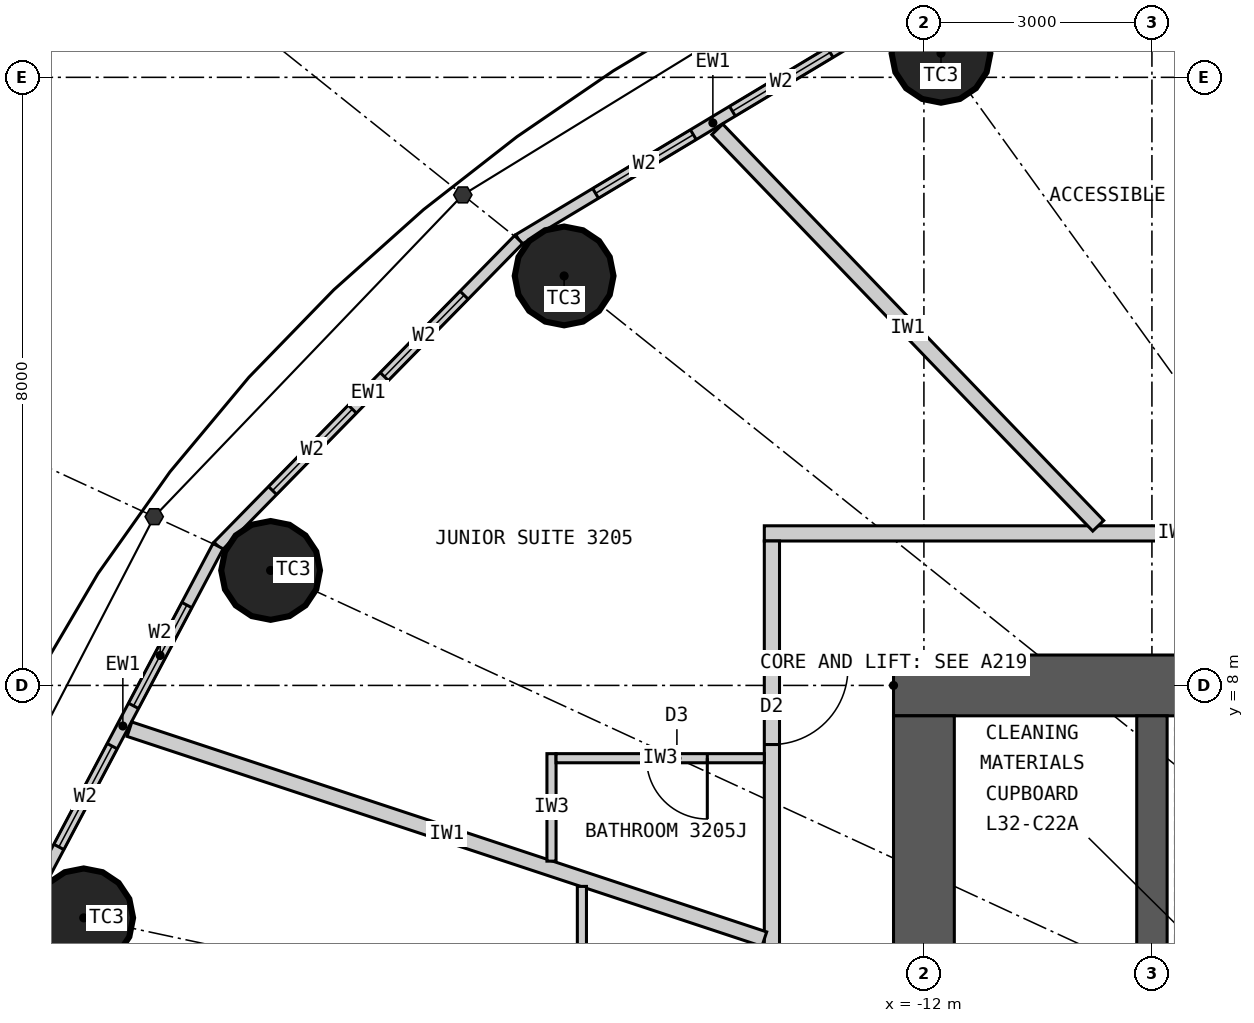
"""IFC4 building model, lengths in metres.
Left out: names, types, materials, properties, quantities, classifications, styles, units other than length and angle.
Written with IfcOpenShell. Run it as: python <this file> out.ifc"""

import sys

from ifc_helpers import new_model, si_unit, direction, frame, frame_2d, origin, origin_2d, place, context, subcontext, project, spatial, rectangle, circle, extrude, element, fill, save


model = new_model("IFC4")
c1 = context("Model", 3, precision=1e-05, world=origin(), true_north=direction((0.0, 1.0)))
c2 = subcontext(c1, "Body", "Model", "MODEL_VIEW")
j1 = project(units=[si_unit("LENGTHUNIT", "METRE"), si_unit("PLANEANGLEUNIT", "RADIAN")], contexts=[c1])
p1 = place(None, origin())
s1 = spatial("IfcSite", under=j1, at=p1, CompositionType="ELEMENT")
p2 = place(p1, origin())
s2 = spatial("IfcBuilding", under=s1, at=p2, CompositionType="ELEMENT")
p3 = place(p2, frame((0.0, 0.0, 125.4)))
s3 = spatial("IfcBuildingStorey", under=s2, at=p3, CompositionType="ELEMENT", Elevation=125.4)
for number, where, z_axis, x_axis in (
    (1, (-11.775, 16.316, 0.0), (0.0, 0.0, 1.0), (1.0, 0.0, 0.0)),
    (2, (-16.734, 13.387, 0.0), (0.0, 0.0, 1.0), (1.0, 0.0, 0.0)),
    (3, (-20.596, 9.513, 0.0), (0.0, 0.0, 1.0), (1.0, 0.0, 0.0)),
    (4, (-23.055, 4.942, 0.0), (0.0, 0.0, 1.0), (1.0, 0.0, 0.0)),
):
    element("IfcColumn", number, at=place(p3, frame(where, z_axis=z_axis, x_axis=x_axis)), inside=s3, PredefinedType="COLUMN", context=c2, shape_type="SweptSolid", body=[
        extrude(circle(Radius=0.65, at=origin_2d()), origin(), (0.0, 0.0, 1.0), 3.3),
    ])
p4 = place(p3, frame((-12.4, 8.0, 0.0), z_axis=(0.0, 0.0, 1.0), x_axis=(1.0, 0.0, 0.0)))
e5 = element("IfcWall", 5, at=p4, inside=s3, PredefinedType="SHEAR", context=c2, shape_type="SweptSolid", body=[
    extrude(rectangle(XDim=24.8, YDim=0.8, at=frame_2d((12.4, 0.0))), origin(), (0.0, 0.0, 1.0), 3.3),
])
p5 = place(p4, frame((11.1, 0.0, 0.0)))
e6 = element("IfcOpeningElement", 6, at=p5, cuts=e5, PredefinedType="OPENING", context=c2, shape_type="SweptSolid", body=[
    extrude(rectangle(XDim=1.2, YDim=2.2, at=frame_2d((0.6, 1.1))), frame((0.0, 0.41, 0.0), z_axis=(0.0, -1.0, 0.0), x_axis=(1.0, 0.0, 0.0)), (0.0, 0.0, 1.0), 0.82),
])
p6 = place(p4, frame((18.7, 0.0, 0.0)))
e7 = element("IfcOpeningElement", 7, at=p6, cuts=e5, PredefinedType="OPENING", context=c2, shape_type="SweptSolid", body=[
    extrude(rectangle(XDim=0.9, YDim=2.2, at=frame_2d((0.45, 1.1))), frame((0.0, 0.41, 0.0), z_axis=(0.0, -1.0, 0.0), x_axis=(1.0, 0.0, 0.0)), (0.0, 0.0, 1.0), 0.82),
])
p7 = place(p3, frame((-12.0, 7.6, 0.0), z_axis=(0.0, 0.0, 1.0), x_axis=(0.0, -1.0, 0.0)))
e8 = element("IfcWall", 8, at=p7, inside=s3, PredefinedType="SHEAR", context=c2, shape_type="SweptSolid", body=[
    extrude(rectangle(XDim=15.2, YDim=0.8, at=frame_2d((7.6, 0.0))), origin(), (0.0, 0.0, 1.0), 3.3),
])
p8 = place(p7, frame((6.7, 0.0, 0.0)))
e9 = element("IfcOpeningElement", 9, at=p8, cuts=e8, PredefinedType="OPENING", context=c2, shape_type="SweptSolid", body=[
    extrude(rectangle(XDim=1.8, YDim=2.2, at=frame_2d((0.9, 1.1))), frame((0.0, 0.41, 0.0), z_axis=(0.0, -1.0, 0.0), x_axis=(1.0, 0.0, 0.0)), (0.0, 0.0, 1.0), 0.82),
])
p9 = place(p3, frame((-9.0, 4.5, 0.0), z_axis=(0.0, 0.0, 1.0), x_axis=(0.0, 1.0, 0.0)))
e10 = element("IfcWall", 10, at=p9, inside=s3, PredefinedType="SHEAR", context=c2, shape_type="SweptSolid", body=[
    extrude(rectangle(XDim=3.1, YDim=0.4, at=frame_2d((1.55, 0.0))), origin(), (0.0, 0.0, 1.0), 3.3),
])
p10 = place(p3, frame((-12.221, 16.935, 0.0), z_axis=(0.0, 0.0, 1.0), x_axis=(-0.857308573723, -0.514802884044, 0.0)))
e11 = element("IfcWall", 11, at=p10, inside=s3, PredefinedType="ELEMENTEDWALL", context=c2, shape_type="SweptSolid", body=[
    extrude(rectangle(XDim=5.961, YDim=0.15, at=frame_2d((2.98, 0.0))), origin(), (0.0, 0.0, 1.0), 3.12),
])
p11 = place(p10, frame((1.181, 0.0, 0.9)))
e12 = element("IfcOpeningElement", 12, at=p11, cuts=e11, PredefinedType="OPENING", context=c2, shape_type="SweptSolid", body=[
    extrude(rectangle(XDim=1.5, YDim=1.9, at=frame_2d((0.75, 0.95))), frame((0.0, 0.085, 0.0), z_axis=(0.0, -1.0, 0.0), x_axis=(1.0, 0.0, 0.0)), (0.0, 0.0, 1.0), 0.17),
])
p12 = place(p10, frame((3.281, 0.0, 0.9)))
e13 = element("IfcOpeningElement", 13, at=p12, cuts=e11, PredefinedType="OPENING", context=c2, shape_type="SweptSolid", body=[
    extrude(rectangle(XDim=1.5, YDim=1.9, at=frame_2d((0.75, 0.95))), frame((0.0, 0.085, 0.0), z_axis=(0.0, -1.0, 0.0), x_axis=(1.0, 0.0, 0.0)), (0.0, 0.0, 1.0), 0.17),
])
p13 = place(p3, frame((-17.332, 13.866, 0.0), z_axis=(0.0, 0.0, 1.0), x_axis=(-0.700136650834, -0.714008872605, 0.0)))
e14 = element("IfcWall", 14, at=p13, inside=s3, PredefinedType="ELEMENTEDWALL", context=c2, shape_type="SweptSolid", body=[
    extrude(rectangle(XDim=5.649, YDim=0.15, at=frame_2d((2.825, 0.0))), origin(), (0.0, 0.0, 1.0), 3.12),
])
p14 = place(p13, frame((1.025, 0.0, 0.9)))
e15 = element("IfcOpeningElement", 15, at=p14, cuts=e14, PredefinedType="OPENING", context=c2, shape_type="SweptSolid", body=[
    extrude(rectangle(XDim=1.5, YDim=1.9, at=frame_2d((0.75, 0.95))), frame((0.0, 0.085, 0.0), z_axis=(0.0, -1.0, 0.0), x_axis=(1.0, 0.0, 0.0)), (0.0, 0.0, 1.0), 0.17),
])
p15 = place(p13, frame((3.125, 0.0, 0.9)))
e16 = element("IfcOpeningElement", 16, at=p15, cuts=e14, PredefinedType="OPENING", context=c2, shape_type="SweptSolid", body=[
    extrude(rectangle(XDim=1.5, YDim=1.9, at=frame_2d((0.75, 0.95))), frame((0.0, 0.085, 0.0), z_axis=(0.0, -1.0, 0.0), x_axis=(1.0, 0.0, 0.0)), (0.0, 0.0, 1.0), 0.17),
])
p16 = place(p3, frame((-21.287, 9.832, 0.0), z_axis=(0.0, 0.0, 1.0), x_axis=(-0.467814388454, -0.883826735257, 0.0)))
e17 = element("IfcWall", 17, at=p16, inside=s3, PredefinedType="ELEMENTEDWALL", context=c2, shape_type="SweptSolid", body=[
    extrude(rectangle(XDim=5.354, YDim=0.15, at=frame_2d((2.677, 0.0))), origin(), (0.0, 0.0, 1.0), 3.12),
])
p17 = place(p16, frame((0.877, 0.0, 0.9)))
e18 = element("IfcOpeningElement", 18, at=p17, cuts=e17, PredefinedType="OPENING", context=c2, shape_type="SweptSolid", body=[
    extrude(rectangle(XDim=1.5, YDim=1.9, at=frame_2d((0.75, 0.95))), frame((0.0, 0.085, 0.0), z_axis=(0.0, -1.0, 0.0), x_axis=(1.0, 0.0, 0.0)), (0.0, 0.0, 1.0), 0.17),
])
p18 = place(p16, frame((2.977, 0.0, 0.9)))
e19 = element("IfcOpeningElement", 19, at=p18, cuts=e17, PredefinedType="OPENING", context=c2, shape_type="SweptSolid", body=[
    extrude(rectangle(XDim=1.5, YDim=1.9, at=frame_2d((0.75, 0.95))), frame((0.0, 0.085, 0.0), z_axis=(0.0, -1.0, 0.0), x_axis=(1.0, 0.0, 0.0)), (0.0, 0.0, 1.0), 0.17),
])
p19 = place(p3, frame((-14.1, 10.0, 0.0), z_axis=(0.0, 0.0, 1.0), x_axis=(1.0, 0.0, 0.0)))
e20 = element("IfcWall", 20, at=p19, inside=s3, PredefinedType="PARTITIONING", context=c2, shape_type="SweptSolid", body=[
    extrude(rectangle(XDim=10.817, YDim=0.2, at=frame_2d((5.409, 0.0))), origin(), (0.0, 0.0, 1.0), 3.12),
])
p20 = place(p3, frame((-14.0, 9.9, 0.0), z_axis=(0.0, 0.0, 1.0), x_axis=(0.0, -1.0, 0.0)))
e21 = element("IfcWall", 21, at=p20, inside=s3, PredefinedType="PARTITIONING", context=c2, shape_type="SweptSolid", body=[
    extrude(rectangle(XDim=19.8, YDim=0.2, at=frame_2d((9.9, 0.0))), origin(), (0.0, 0.0, 1.0), 3.12),
])
p21 = place(p20, frame((1.678, 0.0, 0.0)))
e22 = element("IfcOpeningElement", 22, at=p21, cuts=e21, PredefinedType="OPENING", context=c2, shape_type="SweptSolid", body=[
    extrude(rectangle(XDim=1.0, YDim=2.2, at=frame_2d((0.5, 1.1))), frame((0.0, 0.11, 0.0), z_axis=(0.0, -1.0, 0.0), x_axis=(1.0, 0.0, 0.0)), (0.0, 0.0, 1.0), 0.22),
])
p22 = place(p20, frame((7.598, 0.0, 0.0)))
e23 = element("IfcOpeningElement", 23, at=p22, cuts=e21, PredefinedType="OPENING", context=c2, shape_type="SweptSolid", body=[
    extrude(rectangle(XDim=1.0, YDim=2.2, at=frame_2d((0.5, 1.1))), frame((0.0, 0.11, 0.0), z_axis=(0.0, -1.0, 0.0), x_axis=(1.0, 0.0, 0.0)), (0.0, 0.0, 1.0), 0.22),
])
p23 = place(p20, frame((12.26, 0.0, 0.0)))
e24 = element("IfcOpeningElement", 24, at=p23, cuts=e21, PredefinedType="OPENING", context=c2, shape_type="SweptSolid", body=[
    extrude(rectangle(XDim=1.0, YDim=2.2, at=frame_2d((0.5, 1.1))), frame((0.0, 0.11, 0.0), z_axis=(0.0, -1.0, 0.0), x_axis=(1.0, 0.0, 0.0)), (0.0, 0.0, 1.0), 0.22),
])
p24 = place(p20, frame((16.922, 0.0, 0.0)))
e25 = element("IfcOpeningElement", 25, at=p24, cuts=e21, PredefinedType="OPENING", context=c2, shape_type="SweptSolid", body=[
    extrude(rectangle(XDim=1.0, YDim=2.2, at=frame_2d((0.5, 1.1))), frame((0.0, 0.11, 0.0), z_axis=(0.0, -1.0, 0.0), x_axis=(1.0, 0.0, 0.0)), (0.0, 0.0, 1.0), 0.22),
])
p25 = place(p3, frame((-9.706, 10.1, 0.0), z_axis=(0.0, 0.0, 1.0), x_axis=(-0.692944801824, 0.720990639069, 0.0)))
e26 = element("IfcWall", 26, at=p25, inside=s3, PredefinedType="PARTITIONING", context=c2, shape_type="SweptSolid", body=[
    extrude(rectangle(XDim=7.234, YDim=0.2, at=frame_2d((3.617, 0.0))), origin(), (0.0, 0.0, 1.0), 3.12),
])
p26 = place(p3, frame((-14.1, 4.662, 0.0), z_axis=(0.0, 0.0, 1.0), x_axis=(-0.949446466373, 0.313928984789, 0.0)))
e27 = element("IfcWall", 27, at=p26, inside=s3, PredefinedType="PARTITIONING", context=c2, shape_type="SweptSolid", body=[
    extrude(rectangle(XDim=8.797, YDim=0.2, at=frame_2d((4.399, 0.0))), origin(), (0.0, 0.0, 1.0), 3.12),
])
p27 = place(p3, frame((-16.9, 5.688, 0.0), z_axis=(0.0, 0.0, 1.0), x_axis=(0.0, 1.0, 0.0)))
e28 = element("IfcWall", 28, at=p27, inside=s3, PredefinedType="PARTITIONING", context=c2, shape_type="SweptSolid", body=[
    extrude(rectangle(XDim=1.414, YDim=0.12, at=frame_2d((0.707, 0.0))), origin(), (0.0, 0.0, 1.0), 3.12),
])
p28 = place(p3, frame((-14.1, 7.042, 0.0), z_axis=(0.0, 0.0, 1.0), x_axis=(-1.0, 0.0, 0.0)))
e29 = element("IfcWall", 29, at=p28, inside=s3, PredefinedType="PARTITIONING", context=c2, shape_type="SweptSolid", body=[
    extrude(rectangle(XDim=2.74, YDim=0.12, at=frame_2d((1.37, 0.0))), origin(), (0.0, 0.0, 1.0), 3.12),
])
p29 = place(p28, frame((0.75, 0.0, 0.0)))
e30 = element("IfcOpeningElement", 30, at=p29, cuts=e29, PredefinedType="OPENING", context=c2, shape_type="SweptSolid", body=[
    extrude(rectangle(XDim=0.8, YDim=2.1, at=frame_2d((0.4, 1.05))), frame((0.0, 0.07, 0.0), z_axis=(0.0, -1.0, 0.0), x_axis=(1.0, 0.0, 0.0)), (0.0, 0.0, 1.0), 0.14),
])
p30 = place(p3, frame((-16.5, 5.356, 0.0), z_axis=(0.0, 0.0, 1.0), x_axis=(0.0, -1.0, 0.0)))
e31 = element("IfcWall", 31, at=p30, inside=s3, PredefinedType="PARTITIONING", context=c2, shape_type="SweptSolid", body=[
    extrude(rectangle(XDim=2.934, YDim=0.12, at=frame_2d((1.467, 0.0))), origin(), (0.0, 0.0, 1.0), 3.12),
])
p31 = place(p11, origin())
e32 = element("IfcWindow", 32, at=p31, inside=s3, PartitioningType="SINGLE_PANEL", PredefinedType="WINDOW", context=c2, shape_type="SweptSolid", body=[
    extrude(rectangle(XDim=1.5, YDim=1.9, at=frame_2d((0.75, 0.95))), frame((0.0, 0.03, 0.0), z_axis=(0.0, -1.0, 0.0), x_axis=(1.0, 0.0, 0.0)), (0.0, 0.0, 1.0), 0.06),
])
fill(e12, e32)
p32 = place(p12, origin())
e33 = element("IfcWindow", 33, at=p32, inside=s3, PartitioningType="SINGLE_PANEL", PredefinedType="WINDOW", context=c2, shape_type="SweptSolid", body=[
    extrude(rectangle(XDim=1.5, YDim=1.9, at=frame_2d((0.75, 0.95))), frame((0.0, 0.03, 0.0), z_axis=(0.0, -1.0, 0.0), x_axis=(1.0, 0.0, 0.0)), (0.0, 0.0, 1.0), 0.06),
])
fill(e13, e33)
p33 = place(p14, origin())
e34 = element("IfcWindow", 34, at=p33, inside=s3, PartitioningType="SINGLE_PANEL", PredefinedType="WINDOW", context=c2, shape_type="SweptSolid", body=[
    extrude(rectangle(XDim=1.5, YDim=1.9, at=frame_2d((0.75, 0.95))), frame((0.0, 0.03, 0.0), z_axis=(0.0, -1.0, 0.0), x_axis=(1.0, 0.0, 0.0)), (0.0, 0.0, 1.0), 0.06),
])
fill(e15, e34)
p34 = place(p15, origin())
e35 = element("IfcWindow", 35, at=p34, inside=s3, PartitioningType="SINGLE_PANEL", PredefinedType="WINDOW", context=c2, shape_type="SweptSolid", body=[
    extrude(rectangle(XDim=1.5, YDim=1.9, at=frame_2d((0.75, 0.95))), frame((0.0, 0.03, 0.0), z_axis=(0.0, -1.0, 0.0), x_axis=(1.0, 0.0, 0.0)), (0.0, 0.0, 1.0), 0.06),
])
fill(e16, e35)
p35 = place(p17, origin())
e36 = element("IfcWindow", 36, at=p35, inside=s3, PartitioningType="SINGLE_PANEL", PredefinedType="WINDOW", context=c2, shape_type="SweptSolid", body=[
    extrude(rectangle(XDim=1.5, YDim=1.9, at=frame_2d((0.75, 0.95))), frame((0.0, 0.03, 0.0), z_axis=(0.0, -1.0, 0.0), x_axis=(1.0, 0.0, 0.0)), (0.0, 0.0, 1.0), 0.06),
])
fill(e18, e36)
p36 = place(p18, origin())
e37 = element("IfcWindow", 37, at=p36, inside=s3, PartitioningType="SINGLE_PANEL", PredefinedType="WINDOW", context=c2, shape_type="SweptSolid", body=[
    extrude(rectangle(XDim=1.5, YDim=1.9, at=frame_2d((0.75, 0.95))), frame((0.0, 0.03, 0.0), z_axis=(0.0, -1.0, 0.0), x_axis=(1.0, 0.0, 0.0)), (0.0, 0.0, 1.0), 0.06),
])
fill(e19, e37)
p37 = place(p29, origin())
e38 = element("IfcDoor", 38, at=p37, inside=s3, OperationType="SINGLE_SWING_LEFT", PredefinedType="DOOR", context=c2, shape_type="SweptSolid", body=[
    extrude(rectangle(XDim=0.8, YDim=2.1, at=frame_2d((0.4, 1.05))), frame((0.0, 0.025, 0.0), z_axis=(0.0, -1.0, 0.0), x_axis=(1.0, 0.0, 0.0)), (0.0, 0.0, 1.0), 0.05),
])
fill(e30, e38)
p38 = place(p21, origin())
e39 = element("IfcDoor", 39, at=p38, inside=s3, OperationType="SINGLE_SWING_LEFT", PredefinedType="DOOR", context=c2, shape_type="SweptSolid", body=[
    extrude(rectangle(XDim=1.0, YDim=2.2, at=frame_2d((0.5, 1.1))), frame((0.0, 0.025, 0.0), z_axis=(0.0, -1.0, 0.0), x_axis=(1.0, 0.0, 0.0)), (0.0, 0.0, 1.0), 0.05),
])
fill(e22, e39)
save(model, sys.argv[1])
